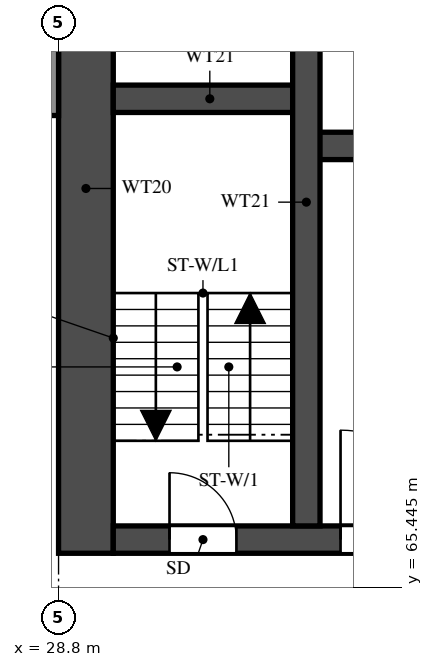
"""IFC4 building model, lengths in metres.
Left out: names, types, materials, properties, quantities, classifications, styles, units other than length and angle.
Written with IfcOpenShell. Run it as: python <this file> out.ifc"""

import sys

from ifc_helpers import new_model, si_unit, direction, frame, frame_2d, origin, place, context, subcontext, project, spatial, rectangle, extrude, element, fill, save


model = new_model("IFC4")
c1 = context("Model", 3, precision=1e-05, world=origin(), true_north=direction((0.0, 1.0)))
c2 = subcontext(c1, "Body", "Model", "MODEL_VIEW")
j1 = project(units=[si_unit("LENGTHUNIT", "METRE"), si_unit("PLANEANGLEUNIT", "RADIAN")], contexts=[c1])
p1 = place(None, origin())
s1 = spatial("IfcSite", under=j1, at=p1, CompositionType="ELEMENT")
p2 = place(p1, origin())
s2 = spatial("IfcBuilding", under=s1, at=p2, CompositionType="ELEMENT")
p3 = place(p2, frame((0.0, 0.0, 37.5)))
s3 = spatial("IfcBuildingStorey", under=s2, at=p3, CompositionType="ELEMENT", Elevation=37.5)
p4 = place(p3, frame((29.25, 66.0, 0.0), z_axis=(0.0, 0.0, 1.0), x_axis=(0.0, 1.0, 0.0)))
e1 = element("IfcWall", 1, at=p4, inside=s3, PredefinedType="SHEAR", context=c2, shape_type="SweptSolid", body=[
    extrude(rectangle(XDim=12.0, YDim=0.9, at=frame_2d((6.0, 0.0))), origin(), (0.0, 0.0, 1.0), 3.18),
])
p5 = place(p3, frame((29.7, 66.225, 0.0), z_axis=(0.0, 0.0, 1.0), x_axis=(1.0, 0.0, 0.0)))
e2 = element("IfcWall", 2, at=p5, inside=s3, PredefinedType="SHEAR", context=c2, shape_type="SweptSolid", body=[
    extrude(rectangle(XDim=41.4, YDim=0.45, at=frame_2d((20.7, 0.0))), origin(), (0.0, 0.0, 1.0), 3.18),
])
p6 = place(p5, frame((0.925, 0.0, 0.0)))
e3 = element("IfcOpeningElement", 3, at=p6, cuts=e2, PredefinedType="OPENING", context=c2, shape_type="SweptSolid", body=[
    extrude(rectangle(XDim=1.1, YDim=2.1, at=frame_2d((0.55, 1.05))), frame((0.0, 0.235, 0.0), z_axis=(0.0, -1.0, 0.0), x_axis=(1.0, 0.0, 0.0)), (0.0, 0.0, 1.0), 0.47),
])
p7 = place(p5, frame((3.738, 0.0, 0.0)))
e4 = element("IfcOpeningElement", 4, at=p7, cuts=e2, PredefinedType="OPENING", context=c2, shape_type="SweptSolid", body=[
    extrude(rectangle(XDim=1.8, YDim=2.1, at=frame_2d((0.9, 1.05))), frame((0.0, 0.235, 0.0), z_axis=(0.0, -1.0, 0.0), x_axis=(1.0, 0.0, 0.0)), (0.0, 0.0, 1.0), 0.47),
])
p8 = place(p3, frame((32.875, 72.7, 0.0), z_axis=(0.0, 0.0, 1.0), x_axis=(1.0, 0.0, 0.0)))
e5 = element("IfcWall", 5, at=p8, inside=s3, PredefinedType="SHEAR", context=c2, shape_type="SweptSolid", body=[
    extrude(rectangle(XDim=35.05, YDim=0.45, at=frame_2d((17.525, 0.0))), origin(), (0.0, 0.0, 1.0), 3.18),
])
p9 = place(p8, frame((19.8, 0.0, 0.0)))
e6 = element("IfcOpeningElement", 6, at=p9, cuts=e5, PredefinedType="OPENING", context=c2, shape_type="SweptSolid", body=[
    extrude(rectangle(XDim=1.1, YDim=2.1, at=frame_2d((0.55, 1.05))), frame((0.0, 0.235, 0.0), z_axis=(0.0, -1.0, 0.0), x_axis=(1.0, 0.0, 0.0)), (0.0, 0.0, 1.0), 0.47),
])
p10 = place(p8, frame((27.65, 0.0, 0.0)))
e7 = element("IfcOpeningElement", 7, at=p10, cuts=e5, PredefinedType="OPENING", context=c2, shape_type="SweptSolid", body=[
    extrude(rectangle(XDim=1.1, YDim=2.1, at=frame_2d((0.55, 1.05))), frame((0.0, 0.235, 0.0), z_axis=(0.0, -1.0, 0.0), x_axis=(1.0, 0.0, 0.0)), (0.0, 0.0, 1.0), 0.47),
])
p11 = place(p8, frame((30.25, 0.0, 0.0)))
e8 = element("IfcOpeningElement", 8, at=p11, cuts=e5, PredefinedType="OPENING", context=c2, shape_type="SweptSolid", body=[
    extrude(rectangle(XDim=1.1, YDim=2.1, at=frame_2d((0.55, 1.05))), frame((0.0, 0.235, 0.0), z_axis=(0.0, -1.0, 0.0), x_axis=(1.0, 0.0, 0.0)), (0.0, 0.0, 1.0), 0.47),
])
p12 = place(p8, frame((3.75, 0.0, 0.0)))
e9 = element("IfcOpeningElement", 9, at=p12, cuts=e5, PredefinedType="OPENING", context=c2, shape_type="SweptSolid", body=[
    extrude(rectangle(XDim=1.1, YDim=2.1, at=frame_2d((0.55, 1.05))), frame((0.0, 0.235, 0.0), z_axis=(0.0, -1.0, 0.0), x_axis=(1.0, 0.0, 0.0)), (0.0, 0.0, 1.0), 0.47),
])
p13 = place(p8, frame((6.5, 0.0, 0.0)))
e10 = element("IfcOpeningElement", 10, at=p13, cuts=e5, PredefinedType="OPENING", context=c2, shape_type="SweptSolid", body=[
    extrude(rectangle(XDim=1.1, YDim=2.1, at=frame_2d((0.55, 1.05))), frame((0.0, 0.235, 0.0), z_axis=(0.0, -1.0, 0.0), x_axis=(1.0, 0.0, 0.0)), (0.0, 0.0, 1.0), 0.47),
])
p14 = place(p8, frame((9.25, 0.0, 0.0)))
e11 = element("IfcOpeningElement", 11, at=p14, cuts=e5, PredefinedType="OPENING", context=c2, shape_type="SweptSolid", body=[
    extrude(rectangle(XDim=1.1, YDim=2.1, at=frame_2d((0.55, 1.05))), frame((0.0, 0.235, 0.0), z_axis=(0.0, -1.0, 0.0), x_axis=(1.0, 0.0, 0.0)), (0.0, 0.0, 1.0), 0.47),
])
p15 = place(p8, frame((12.0, 0.0, 0.0)))
e12 = element("IfcOpeningElement", 12, at=p15, cuts=e5, PredefinedType="OPENING", context=c2, shape_type="SweptSolid", body=[
    extrude(rectangle(XDim=1.1, YDim=2.1, at=frame_2d((0.55, 1.05))), frame((0.0, 0.235, 0.0), z_axis=(0.0, -1.0, 0.0), x_axis=(1.0, 0.0, 0.0)), (0.0, 0.0, 1.0), 0.47),
])
p16 = place(p8, frame((14.75, 0.0, 0.0)))
e13 = element("IfcOpeningElement", 13, at=p16, cuts=e5, PredefinedType="OPENING", context=c2, shape_type="SweptSolid", body=[
    extrude(rectangle(XDim=1.1, YDim=2.1, at=frame_2d((0.55, 1.05))), frame((0.0, 0.235, 0.0), z_axis=(0.0, -1.0, 0.0), x_axis=(1.0, 0.0, 0.0)), (0.0, 0.0, 1.0), 0.47),
])
p17 = place(p8, frame((17.5, 0.0, 0.0)))
e14 = element("IfcOpeningElement", 14, at=p17, cuts=e5, PredefinedType="OPENING", context=c2, shape_type="SweptSolid", body=[
    extrude(rectangle(XDim=1.1, YDim=2.1, at=frame_2d((0.55, 1.05))), frame((0.0, 0.235, 0.0), z_axis=(0.0, -1.0, 0.0), x_axis=(1.0, 0.0, 0.0)), (0.0, 0.0, 1.0), 0.47),
])
p18 = place(p8, frame((0.913, 0.0, 0.0)))
e15 = element("IfcOpeningElement", 15, at=p18, cuts=e5, PredefinedType="OPENING", context=c2, shape_type="SweptSolid", body=[
    extrude(rectangle(XDim=1.1, YDim=2.1, at=frame_2d((0.55, 1.05))), frame((0.0, 0.235, 0.0), z_axis=(0.0, -1.0, 0.0), x_axis=(1.0, 0.0, 0.0)), (0.0, 0.0, 1.0), 0.47),
])
p19 = place(p3, frame((29.7, 73.475, 0.0), z_axis=(0.0, 0.0, 1.0), x_axis=(1.0, 0.0, 0.0)))
e16 = element("IfcWall", 16, at=p19, inside=s3, PredefinedType="SHEAR", context=c2, shape_type="SweptSolid", body=[
    extrude(rectangle(XDim=3.175, YDim=0.45, at=frame_2d((1.587, 0.0))), origin(), (0.0, 0.0, 1.0), 3.18),
])
p20 = place(p3, frame((32.875, 66.45, 0.0), z_axis=(0.0, 0.0, 1.0), x_axis=(0.0, 1.0, 0.0)))
e17 = element("IfcWall", 17, at=p20, inside=s3, PredefinedType="SHEAR", context=c2, shape_type="SweptSolid", body=[
    extrude(rectangle(XDim=10.65, YDim=0.45, at=frame_2d((5.325, 0.0))), origin(), (0.0, 0.0, 1.0), 3.18),
])
p21 = place(p3, frame((28.7, 73.2, 0.0), z_axis=(0.0, 0.0, 1.0), x_axis=(0.0, 1.0, 0.0)))
e18 = element("IfcWall", 18, at=p21, inside=s3, PredefinedType="SOLIDWALL", context=c2, shape_type="SweptSolid", body=[
    extrude(rectangle(XDim=4.8, YDim=0.2, at=frame_2d((2.4, 0.0))), origin(), (0.0, 0.0, 1.0), 3.18),
])
p22 = place(p6, origin())
e19 = element("IfcDoor", 19, at=p22, inside=s3, OperationType="SINGLE_SWING_LEFT", PredefinedType="DOOR", context=c2, shape_type="SweptSolid", body=[
    extrude(rectangle(XDim=1.1, YDim=2.1, at=frame_2d((0.55, 1.05))), frame((0.0, 0.025, 0.0), z_axis=(0.0, -1.0, 0.0), x_axis=(1.0, 0.0, 0.0)), (0.0, 0.0, 1.0), 0.05),
])
fill(e3, e19)
p23 = place(p7, origin())
e20 = element("IfcDoor", 20, at=p23, inside=s3, OperationType="DOUBLE_DOOR_SINGLE_SWING", PredefinedType="DOOR", context=c2, shape_type="SweptSolid", body=[
    extrude(rectangle(XDim=1.8, YDim=2.1, at=frame_2d((0.9, 1.05))), frame((0.0, 0.025, 0.0), z_axis=(0.0, -1.0, 0.0), x_axis=(1.0, 0.0, 0.0)), (0.0, 0.0, 1.0), 0.05),
])
fill(e4, e20)
save(model, sys.argv[1])
